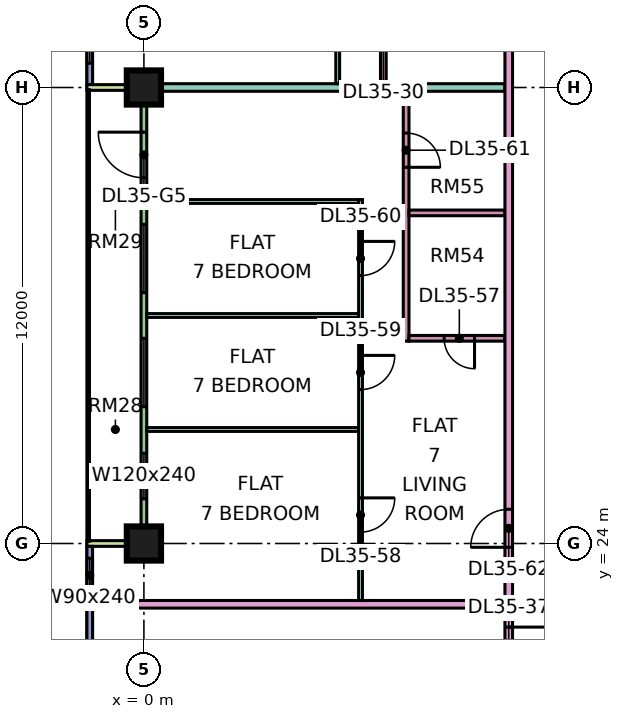
"""IFC4 building model, lengths in metres.
Left out: names, types, materials, properties, quantities, classifications, styles, units other than length and angle.
Written with IfcOpenShell. Run it as: python <this file> out.ifc"""

import sys

from ifc_helpers import new_model, si_unit, direction, frame, frame_2d, origin, origin_2d, place, context, subcontext, project, spatial, rectangle, extrude, element, fill, save


model = new_model("IFC4")
c1 = context("Model", 3, precision=1e-05, world=origin(), true_north=direction((0.0, 1.0)))
c2 = subcontext(c1, "Body", "Model", "MODEL_VIEW")
j1 = project(units=[si_unit("LENGTHUNIT", "METRE"), si_unit("PLANEANGLEUNIT", "RADIAN")], contexts=[c1])
p1 = place(None, origin())
s1 = spatial("IfcSite", under=j1, at=p1, CompositionType="ELEMENT")
p2 = place(p1, origin())
s2 = spatial("IfcBuilding", under=s1, at=p2, CompositionType="ELEMENT")
p3 = place(p2, frame((0.0, 0.0, 157.4)))
s3 = spatial("IfcBuildingStorey", under=s2, at=p3, CompositionType="ELEMENT", Elevation=157.4)
p4 = place(p3, frame((0.0, 24.0, 0.0), z_axis=(0.0, 0.0, 1.0), x_axis=(1.0, 0.0, 0.0)))
e1 = element("IfcColumn", 1, at=p4, inside=s3, PredefinedType="COLUMN", context=c2, shape_type="SweptSolid", body=[
    extrude(rectangle(XDim=0.9, YDim=0.9, at=origin_2d()), origin(), (0.0, 0.0, 1.0), 3.75),
])
p5 = place(p3, frame((0.0, 36.0, 0.0), z_axis=(0.0, 0.0, 1.0), x_axis=(1.0, 0.0, 0.0)))
e2 = element("IfcColumn", 2, at=p5, inside=s3, PredefinedType="COLUMN", context=c2, shape_type="SweptSolid", body=[
    extrude(rectangle(XDim=0.9, YDim=0.9, at=origin_2d()), origin(), (0.0, 0.0, 1.0), 3.75),
])
p6 = place(p3, frame((-1.425, 47.925, 0.0), z_axis=(0.0, 0.0, 1.0), x_axis=(0.0, -1.0, 0.0)))
e3 = element("IfcWall", 3, at=p6, inside=s3, PredefinedType="SOLIDWALL", context=c2, shape_type="SweptSolid", body=[
    extrude(rectangle(XDim=11.85, YDim=0.15, at=frame_2d((5.925, 0.0))), origin(), (0.0, 0.0, 1.0), 3.35),
])
p7 = place(p6, frame((0.562, 0.0, 0.45)))
e4 = element("IfcOpeningElement", 4, at=p7, cuts=e3, PredefinedType="OPENING", context=c2, shape_type="SweptSolid", body=[
    extrude(rectangle(XDim=1.8, YDim=2.4, at=frame_2d((0.9, 1.2))), frame((0.0, 0.085, 0.0), z_axis=(0.0, -1.0, 0.0), x_axis=(1.0, 0.0, 0.0)), (0.0, 0.0, 1.0), 0.17),
])
p8 = place(p6, frame((3.525, 0.0, 0.45)))
e5 = element("IfcOpeningElement", 5, at=p8, cuts=e3, PredefinedType="OPENING", context=c2, shape_type="SweptSolid", body=[
    extrude(rectangle(XDim=1.8, YDim=2.4, at=frame_2d((0.9, 1.2))), frame((0.0, 0.085, 0.0), z_axis=(0.0, -1.0, 0.0), x_axis=(1.0, 0.0, 0.0)), (0.0, 0.0, 1.0), 0.17),
])
p9 = place(p6, frame((6.525, 0.0, 0.45)))
e6 = element("IfcOpeningElement", 6, at=p9, cuts=e3, PredefinedType="OPENING", context=c2, shape_type="SweptSolid", body=[
    extrude(rectangle(XDim=1.8, YDim=2.4, at=frame_2d((0.9, 1.2))), frame((0.0, 0.085, 0.0), z_axis=(0.0, -1.0, 0.0), x_axis=(1.0, 0.0, 0.0)), (0.0, 0.0, 1.0), 0.17),
])
p10 = place(p6, frame((9.488, 0.0, 0.45)))
e7 = element("IfcOpeningElement", 7, at=p10, cuts=e3, PredefinedType="OPENING", context=c2, shape_type="SweptSolid", body=[
    extrude(rectangle(XDim=1.8, YDim=2.4, at=frame_2d((0.9, 1.2))), frame((0.0, 0.085, 0.0), z_axis=(0.0, -1.0, 0.0), x_axis=(1.0, 0.0, 0.0)), (0.0, 0.0, 1.0), 0.17),
])
p11 = place(p3, frame((0.0, 35.925, 0.0), z_axis=(0.0, 0.0, 1.0), x_axis=(0.0, -1.0, 0.0)))
e8 = element("IfcWall", 8, at=p11, inside=s3, PredefinedType="SOLIDWALL", context=c2, shape_type="SweptSolid", body=[
    extrude(rectangle(XDim=11.85, YDim=0.15, at=frame_2d((5.925, 0.0))), origin(), (0.0, 0.0, 1.0), 3.35),
])
p12 = place(p11, frame((1.1, 0.0, 0.0)))
e9 = element("IfcOpeningElement", 9, at=p12, cuts=e8, PredefinedType="OPENING", context=c2, shape_type="SweptSolid", body=[
    extrude(rectangle(XDim=1.2, YDim=2.4, at=frame_2d((0.6, 1.2))), frame((0.0, 0.085, 0.0), z_axis=(0.0, -1.0, 0.0), x_axis=(1.0, 0.0, 0.0)), (0.0, 0.0, 1.0), 0.17),
])
p13 = place(p11, frame((3.525, 0.0, 0.45)))
e10 = element("IfcOpeningElement", 10, at=p13, cuts=e8, PredefinedType="OPENING", context=c2, shape_type="SweptSolid", body=[
    extrude(rectangle(XDim=1.8, YDim=2.4, at=frame_2d((0.9, 1.2))), frame((0.0, 0.085, 0.0), z_axis=(0.0, -1.0, 0.0), x_axis=(1.0, 0.0, 0.0)), (0.0, 0.0, 1.0), 0.17),
])
p14 = place(p11, frame((6.525, 0.0, 0.45)))
e11 = element("IfcOpeningElement", 11, at=p14, cuts=e8, PredefinedType="OPENING", context=c2, shape_type="SweptSolid", body=[
    extrude(rectangle(XDim=1.8, YDim=2.4, at=frame_2d((0.9, 1.2))), frame((0.0, 0.085, 0.0), z_axis=(0.0, -1.0, 0.0), x_axis=(1.0, 0.0, 0.0)), (0.0, 0.0, 1.0), 0.17),
])
p15 = place(p11, frame((9.55, 0.0, 0.45)))
e12 = element("IfcOpeningElement", 12, at=p15, cuts=e8, PredefinedType="OPENING", context=c2, shape_type="SweptSolid", body=[
    extrude(rectangle(XDim=1.2, YDim=2.4, at=frame_2d((0.6, 1.2))), frame((0.0, 0.085, 0.0), z_axis=(0.0, -1.0, 0.0), x_axis=(1.0, 0.0, 0.0)), (0.0, 0.0, 1.0), 0.17),
])
for number, where, z_axis, x_axis in (
    (13, (-1.5, 36.0, 0.0), (0.0, 0.0, 1.0), (1.0, 0.0, 0.0)),
    (14, (-1.5, 24.0, 0.0), (0.0, 0.0, 1.0), (1.0, 0.0, 0.0)),
):
    element("IfcWall", number, at=place(p3, frame(where, z_axis=z_axis, x_axis=x_axis)), inside=s3, PredefinedType="SOLIDWALL", context=c2, shape_type="SweptSolid", body=[
        extrude(rectangle(XDim=1.5, YDim=0.15, at=frame_2d((0.75, 0.0))), origin(), (0.0, 0.0, 1.0), 3.35),
    ])
p16 = place(p3, frame((-1.425, 23.925, 0.0), z_axis=(0.0, 0.0, 1.0), x_axis=(0.0, -1.0, 0.0)))
e15 = element("IfcWall", 15, at=p16, inside=s3, PredefinedType="SOLIDWALL", context=c2, shape_type="SweptSolid", body=[
    extrude(rectangle(XDim=11.425, YDim=0.15, at=frame_2d((5.712, 0.0))), origin(), (0.0, 0.0, 1.0), 3.35),
])
p17 = place(p16, frame((0.312, 0.0, 0.45)))
e16 = element("IfcOpeningElement", 16, at=p17, cuts=e15, PredefinedType="OPENING", context=c2, shape_type="SweptSolid", body=[
    extrude(rectangle(XDim=0.9, YDim=2.4, at=frame_2d((0.45, 1.2))), frame((0.0, 0.085, 0.0), z_axis=(0.0, -1.0, 0.0), x_axis=(1.0, 0.0, 0.0)), (0.0, 0.0, 1.0), 0.17),
])
p18 = place(p16, frame((6.175, 0.0, 0.45)))
e17 = element("IfcOpeningElement", 17, at=p18, cuts=e15, PredefinedType="OPENING", context=c2, shape_type="SweptSolid", body=[
    extrude(rectangle(XDim=3.0, YDim=2.4, at=frame_2d((1.5, 1.2))), frame((0.0, 0.085, 0.0), z_axis=(0.0, -1.0, 0.0), x_axis=(1.0, 0.0, 0.0)), (0.0, 0.0, 1.0), 0.17),
])
p19 = place(p3, frame((-1.35, 22.4, 0.0), z_axis=(0.0, 0.0, 1.0), x_axis=(1.0, 0.0, 0.0)))
e18 = element("IfcWall", 18, at=p19, inside=s3, PredefinedType="PARTITIONING", context=c2, shape_type="SweptSolid", body=[
    extrude(rectangle(XDim=10.85, YDim=0.2, at=frame_2d((5.425, 0.0))), origin(), (0.0, 0.0, 1.0), 3.35),
])
e19 = element("IfcWall", 19, at=p5, inside=s3, PredefinedType="PARTITIONING", context=c2, shape_type="SweptSolid", body=[
    extrude(rectangle(XDim=9.5, YDim=0.2, at=frame_2d((4.75, 0.0))), origin(), (0.0, 0.0, 1.0), 3.35),
])
for number, where, z_axis, x_axis in (
    (20, (0.074, 27.0, 0.0), (0.0, 0.0, 1.0), (1.0, 0.0, 0.0)),
    (21, (0.074, 30.0, 0.0), (0.0, 0.0, 1.0), (1.0, 0.0, 0.0)),
    (22, (0.074, 33.0, 0.0), (0.0, 0.0, 1.0), (1.0, 0.0, 0.0)),
):
    element("IfcWall", number, at=place(p3, frame(where, z_axis=z_axis, x_axis=x_axis)), inside=s3, PredefinedType="PARTITIONING", context=c2, shape_type="SweptSolid", body=[
        extrude(rectangle(XDim=5.576, YDim=0.1, at=frame_2d((2.788, 0.0))), origin(), (0.0, 0.0, 1.0), 3.35),
    ])
p20 = place(p3, frame((5.1, 36.1, 0.0), z_axis=(0.0, 0.0, 1.0), x_axis=(0.0, 1.0, 0.0)))
e23 = element("IfcWall", 23, at=p20, inside=s3, PredefinedType="PARTITIONING", context=c2, shape_type="SweptSolid", body=[
    extrude(rectangle(XDim=26.826, YDim=0.1, at=frame_2d((13.413, 0.0))), origin(), (0.0, 0.0, 1.0), 3.35),
])
p21 = place(p20, frame((0.95, 0.0, 0.0)))
e24 = element("IfcOpeningElement", 24, at=p21, cuts=e23, PredefinedType="OPENING", context=c2, shape_type="SweptSolid", body=[
    extrude(rectangle(XDim=0.9, YDim=2.1, at=frame_2d((0.45, 1.05))), frame((0.0, 0.06, 0.0), z_axis=(0.0, -1.0, 0.0), x_axis=(1.0, 0.0, 0.0)), (0.0, 0.0, 1.0), 0.12),
])
p22 = place(p20, frame((3.95, 0.0, 0.0)))
e25 = element("IfcOpeningElement", 25, at=p22, cuts=e23, PredefinedType="OPENING", context=c2, shape_type="SweptSolid", body=[
    extrude(rectangle(XDim=0.9, YDim=2.1, at=frame_2d((0.45, 1.05))), frame((0.0, 0.06, 0.0), z_axis=(0.0, -1.0, 0.0), x_axis=(1.0, 0.0, 0.0)), (0.0, 0.0, 1.0), 0.12),
])
p23 = place(p20, frame((6.95, 0.0, 0.0)))
e26 = element("IfcOpeningElement", 26, at=p23, cuts=e23, PredefinedType="OPENING", context=c2, shape_type="SweptSolid", body=[
    extrude(rectangle(XDim=0.9, YDim=2.1, at=frame_2d((0.45, 1.05))), frame((0.0, 0.06, 0.0), z_axis=(0.0, -1.0, 0.0), x_axis=(1.0, 0.0, 0.0)), (0.0, 0.0, 1.0), 0.12),
])
p24 = place(p20, frame((9.95, 0.0, 0.0)))
e27 = element("IfcOpeningElement", 27, at=p24, cuts=e23, PredefinedType="OPENING", context=c2, shape_type="SweptSolid", body=[
    extrude(rectangle(XDim=0.9, YDim=2.1, at=frame_2d((0.45, 1.05))), frame((0.0, 0.06, 0.0), z_axis=(0.0, -1.0, 0.0), x_axis=(1.0, 0.0, 0.0)), (0.0, 0.0, 1.0), 0.12),
])
p25 = place(p20, frame((21.95, 0.0, 0.0)))
e28 = element("IfcOpeningElement", 28, at=p25, cuts=e23, PredefinedType="OPENING", context=c2, shape_type="SweptSolid", body=[
    extrude(rectangle(XDim=0.9, YDim=2.1, at=frame_2d((0.45, 1.05))), frame((0.0, 0.06, 0.0), z_axis=(0.0, -1.0, 0.0), x_axis=(1.0, 0.0, 0.0)), (0.0, 0.0, 1.0), 0.12),
])
p26 = place(p20, frame((15.95, 0.0, 0.0)))
e29 = element("IfcOpeningElement", 29, at=p26, cuts=e23, PredefinedType="OPENING", context=c2, shape_type="SweptSolid", body=[
    extrude(rectangle(XDim=0.9, YDim=2.1, at=frame_2d((0.45, 1.05))), frame((0.0, 0.06, 0.0), z_axis=(0.0, -1.0, 0.0), x_axis=(1.0, 0.0, 0.0)), (0.0, 0.0, 1.0), 0.12),
])
p27 = place(p20, frame((24.95, 0.0, 0.0)))
e30 = element("IfcOpeningElement", 30, at=p27, cuts=e23, PredefinedType="OPENING", context=c2, shape_type="SweptSolid", body=[
    extrude(rectangle(XDim=0.9, YDim=2.1, at=frame_2d((0.45, 1.05))), frame((0.0, 0.06, 0.0), z_axis=(0.0, -1.0, 0.0), x_axis=(1.0, 0.0, 0.0)), (0.0, 0.0, 1.0), 0.12),
])
p28 = place(p3, frame((5.7, 22.5, 0.0), z_axis=(0.0, 0.0, 1.0), x_axis=(0.0, 1.0, 0.0)))
e31 = element("IfcWall", 31, at=p28, inside=s3, PredefinedType="PARTITIONING", context=c2, shape_type="SweptSolid", body=[
    extrude(rectangle(XDim=10.55, YDim=0.1, at=frame_2d((5.275, 0.0))), origin(), (0.0, 0.0, 1.0), 3.35),
])
p29 = place(p28, frame((1.8, 0.0, 0.0)))
e32 = element("IfcOpeningElement", 32, at=p29, cuts=e31, PredefinedType="OPENING", context=c2, shape_type="SweptSolid", body=[
    extrude(rectangle(XDim=0.9, YDim=2.1, at=frame_2d((0.45, 1.05))), frame((0.0, 0.06, 0.0), z_axis=(0.0, -1.0, 0.0), x_axis=(1.0, 0.0, 0.0)), (0.0, 0.0, 1.0), 0.12),
])
p30 = place(p28, frame((5.55, 0.0, 0.0)))
e33 = element("IfcOpeningElement", 33, at=p30, cuts=e31, PredefinedType="OPENING", context=c2, shape_type="SweptSolid", body=[
    extrude(rectangle(XDim=0.9, YDim=2.1, at=frame_2d((0.45, 1.05))), frame((0.0, 0.06, 0.0), z_axis=(0.0, -1.0, 0.0), x_axis=(1.0, 0.0, 0.0)), (0.0, 0.0, 1.0), 0.12),
])
p31 = place(p28, frame((8.55, 0.0, 0.0)))
e34 = element("IfcOpeningElement", 34, at=p31, cuts=e31, PredefinedType="OPENING", context=c2, shape_type="SweptSolid", body=[
    extrude(rectangle(XDim=0.9, YDim=2.1, at=frame_2d((0.45, 1.05))), frame((0.0, 0.06, 0.0), z_axis=(0.0, -1.0, 0.0), x_axis=(1.0, 0.0, 0.0)), (0.0, 0.0, 1.0), 0.12),
])
p32 = place(p3, frame((6.3, 36.1, 0.0), z_axis=(0.0, 0.0, 1.0), x_axis=(0.0, 1.0, 0.0)))
e35 = element("IfcWall", 35, at=p32, inside=s3, PredefinedType="PARTITIONING", context=c2, shape_type="SweptSolid", body=[
    extrude(rectangle(XDim=23.65, YDim=0.15, at=frame_2d((11.825, 0.0))), origin(), (0.0, 0.0, 1.0), 3.35),
])
p33 = place(p32, frame((15.95, 0.0, 0.0)))
e36 = element("IfcOpeningElement", 36, at=p33, cuts=e35, PredefinedType="OPENING", context=c2, shape_type="SweptSolid", body=[
    extrude(rectangle(XDim=0.8, YDim=2.1, at=frame_2d((0.4, 1.05))), frame((0.0, 0.085, 0.0), z_axis=(0.0, -1.0, 0.0), x_axis=(1.0, 0.0, 0.0)), (0.0, 0.0, 1.0), 0.17),
])
p34 = place(p32, frame((5.75, 0.0, 0.0)))
e37 = element("IfcOpeningElement", 37, at=p34, cuts=e35, PredefinedType="OPENING", context=c2, shape_type="SweptSolid", body=[
    extrude(rectangle(XDim=0.9, YDim=2.1, at=frame_2d((0.45, 1.05))), frame((0.0, 0.085, 0.0), z_axis=(0.0, -1.0, 0.0), x_axis=(1.0, 0.0, 0.0)), (0.0, 0.0, 1.0), 0.17),
])
p35 = place(p32, frame((0.95, 0.0, 0.0)))
e38 = element("IfcOpeningElement", 38, at=p35, cuts=e35, PredefinedType="OPENING", context=c2, shape_type="SweptSolid", body=[
    extrude(rectangle(XDim=0.8, YDim=2.1, at=frame_2d((0.4, 1.05))), frame((0.0, 0.085, 0.0), z_axis=(0.0, -1.0, 0.0), x_axis=(1.0, 0.0, 0.0)), (0.0, 0.0, 1.0), 0.17),
])
p36 = place(p32, frame((10.55, 0.0, 0.0)))
e39 = element("IfcOpeningElement", 39, at=p36, cuts=e35, PredefinedType="OPENING", context=c2, shape_type="SweptSolid", body=[
    extrude(rectangle(XDim=0.8, YDim=2.1, at=frame_2d((0.4, 1.05))), frame((0.0, 0.085, 0.0), z_axis=(0.0, -1.0, 0.0), x_axis=(1.0, 0.0, 0.0)), (0.0, 0.0, 1.0), 0.17),
])
p37 = place(p32, frame((13.4, 0.0, 0.0)))
e40 = element("IfcOpeningElement", 40, at=p37, cuts=e35, PredefinedType="OPENING", context=c2, shape_type="SweptSolid", body=[
    extrude(rectangle(XDim=0.8, YDim=2.1, at=frame_2d((0.4, 1.05))), frame((0.0, 0.085, 0.0), z_axis=(0.0, -1.0, 0.0), x_axis=(1.0, 0.0, 0.0)), (0.0, 0.0, 1.0), 0.17),
])
p38 = place(p3, frame((6.9, 29.325, 0.0), z_axis=(0.0, 0.0, 1.0), x_axis=(0.0, 1.0, 0.0)))
e41 = element("IfcWall", 41, at=p38, inside=s3, PredefinedType="PARTITIONING", context=c2, shape_type="SweptSolid", body=[
    extrude(rectangle(XDim=6.575, YDim=0.15, at=frame_2d((3.288, 0.0))), origin(), (0.0, 0.0, 1.0), 3.35),
])
p39 = place(p38, frame((4.575, 0.0, 0.0)))
e42 = element("IfcOpeningElement", 42, at=p39, cuts=e41, PredefinedType="OPENING", context=c2, shape_type="SweptSolid", body=[
    extrude(rectangle(XDim=0.9, YDim=2.1, at=frame_2d((0.45, 1.05))), frame((0.0, 0.085, 0.0), z_axis=(0.0, -1.0, 0.0), x_axis=(1.0, 0.0, 0.0)), (0.0, 0.0, 1.0), 0.17),
])
p40 = place(p3, frame((6.975, 29.4, 0.0), z_axis=(0.0, 0.0, 1.0), x_axis=(1.0, 0.0, 0.0)))
e43 = element("IfcWall", 43, at=p40, inside=s3, PredefinedType="PARTITIONING", context=c2, shape_type="SweptSolid", body=[
    extrude(rectangle(XDim=2.525, YDim=0.15, at=frame_2d((1.262, 0.0))), origin(), (0.0, 0.0, 1.0), 3.35),
])
p41 = place(p40, frame((0.925, 0.0, 0.0)))
e44 = element("IfcOpeningElement", 44, at=p41, cuts=e43, PredefinedType="OPENING", context=c2, shape_type="SweptSolid", body=[
    extrude(rectangle(XDim=0.8, YDim=2.1, at=frame_2d((0.4, 1.05))), frame((0.0, 0.085, 0.0), z_axis=(0.0, -1.0, 0.0), x_axis=(1.0, 0.0, 0.0)), (0.0, 0.0, 1.0), 0.17),
])
p42 = place(p3, frame((6.975, 32.7, 0.0), z_axis=(0.0, 0.0, 1.0), x_axis=(1.0, 0.0, 0.0)))
e45 = element("IfcWall", 45, at=p42, inside=s3, PredefinedType="PARTITIONING", context=c2, shape_type="SweptSolid", body=[
    extrude(rectangle(XDim=2.525, YDim=0.15, at=frame_2d((1.262, 0.0))), origin(), (0.0, 0.0, 1.0), 3.35),
])
p43 = place(p3, frame((9.6, 20.0, 0.0), z_axis=(0.0, 0.0, 1.0), x_axis=(0.0, 1.0, 0.0)))
e46 = element("IfcWall", 46, at=p43, inside=s3, PredefinedType="PARTITIONING", context=c2, shape_type="SweptSolid", body=[
    extrude(rectangle(XDim=42.926, YDim=0.2, at=frame_2d((21.463, 0.0))), origin(), (0.0, 0.0, 1.0), 3.35),
])
p44 = place(p43, frame((40.8, 0.0, 0.0)))
e47 = element("IfcOpeningElement", 47, at=p44, cuts=e46, PredefinedType="OPENING", context=c2, shape_type="SweptSolid", body=[
    extrude(rectangle(XDim=1.0, YDim=2.1, at=frame_2d((0.5, 1.05))), frame((0.0, 0.11, 0.0), z_axis=(0.0, -1.0, 0.0), x_axis=(1.0, 0.0, 0.0)), (0.0, 0.0, 1.0), 0.22),
])
p45 = place(p43, frame((0.6, 0.0, 0.0)))
e48 = element("IfcOpeningElement", 48, at=p45, cuts=e46, PredefinedType="OPENING", context=c2, shape_type="SweptSolid", body=[
    extrude(rectangle(XDim=1.2, YDim=2.1, at=frame_2d((0.6, 1.05))), frame((0.0, 0.11, 0.0), z_axis=(0.0, -1.0, 0.0), x_axis=(1.0, 0.0, 0.0)), (0.0, 0.0, 1.0), 0.22),
])
p46 = place(p43, frame((3.9, 0.0, 0.0)))
e49 = element("IfcOpeningElement", 49, at=p46, cuts=e46, PredefinedType="OPENING", context=c2, shape_type="SweptSolid", body=[
    extrude(rectangle(XDim=1.0, YDim=2.1, at=frame_2d((0.5, 1.05))), frame((0.0, 0.11, 0.0), z_axis=(0.0, -1.0, 0.0), x_axis=(1.0, 0.0, 0.0)), (0.0, 0.0, 1.0), 0.22),
])
p47 = place(p10, origin())
e50 = element("IfcWindow", 50, at=p47, inside=s3, PartitioningType="SINGLE_PANEL", PredefinedType="WINDOW", context=c2, shape_type="SweptSolid", body=[
    extrude(rectangle(XDim=1.8, YDim=2.4, at=frame_2d((0.9, 1.2))), frame((0.0, 0.03, 0.0), z_axis=(0.0, -1.0, 0.0), x_axis=(1.0, 0.0, 0.0)), (0.0, 0.0, 1.0), 0.06),
])
fill(e7, e50)
p48 = place(p12, frame((1.2, 0.0, 0.0), z_axis=(0.0, 0.0, 1.0), x_axis=(-1.0, 0.0, 0.0)))
e51 = element("IfcDoor", 51, at=p48, inside=s3, OperationType="DOUBLE_DOOR_SINGLE_SWING", PredefinedType="DOOR", context=c2, shape_type="SweptSolid", body=[
    extrude(rectangle(XDim=1.2, YDim=2.4, at=frame_2d((0.6, 1.2))), frame((0.0, 0.025, 0.0), z_axis=(0.0, -1.0, 0.0), x_axis=(1.0, 0.0, 0.0)), (0.0, 0.0, 1.0), 0.05),
])
fill(e9, e51)
p49 = place(p13, origin())
e52 = element("IfcWindow", 52, at=p49, inside=s3, PartitioningType="SINGLE_PANEL", PredefinedType="WINDOW", context=c2, shape_type="SweptSolid", body=[
    extrude(rectangle(XDim=1.8, YDim=2.4, at=frame_2d((0.9, 1.2))), frame((0.0, 0.03, 0.0), z_axis=(0.0, -1.0, 0.0), x_axis=(1.0, 0.0, 0.0)), (0.0, 0.0, 1.0), 0.06),
])
fill(e10, e52)
p50 = place(p14, origin())
e53 = element("IfcWindow", 53, at=p50, inside=s3, PartitioningType="SINGLE_PANEL", PredefinedType="WINDOW", context=c2, shape_type="SweptSolid", body=[
    extrude(rectangle(XDim=1.8, YDim=2.4, at=frame_2d((0.9, 1.2))), frame((0.0, 0.03, 0.0), z_axis=(0.0, -1.0, 0.0), x_axis=(1.0, 0.0, 0.0)), (0.0, 0.0, 1.0), 0.06),
])
fill(e11, e53)
p51 = place(p15, origin())
e54 = element("IfcWindow", 54, at=p51, inside=s3, PartitioningType="SINGLE_PANEL", PredefinedType="WINDOW", context=c2, shape_type="SweptSolid", body=[
    extrude(rectangle(XDim=1.2, YDim=2.4, at=frame_2d((0.6, 1.2))), frame((0.0, 0.03, 0.0), z_axis=(0.0, -1.0, 0.0), x_axis=(1.0, 0.0, 0.0)), (0.0, 0.0, 1.0), 0.06),
])
fill(e12, e54)
p52 = place(p17, origin())
e55 = element("IfcWindow", 55, at=p52, inside=s3, PartitioningType="SINGLE_PANEL", PredefinedType="WINDOW", context=c2, shape_type="SweptSolid", body=[
    extrude(rectangle(XDim=0.9, YDim=2.4, at=frame_2d((0.45, 1.2))), frame((0.0, 0.03, 0.0), z_axis=(0.0, -1.0, 0.0), x_axis=(1.0, 0.0, 0.0)), (0.0, 0.0, 1.0), 0.06),
])
fill(e16, e55)
p53 = place(p45, origin())
e56 = element("IfcDoor", 56, at=p53, inside=s3, OperationType="SINGLE_SWING_RIGHT", PredefinedType="DOOR", context=c2, shape_type="SweptSolid", body=[
    extrude(rectangle(XDim=1.2, YDim=2.1, at=frame_2d((0.6, 1.05))), frame((0.0, 0.025, 0.0), z_axis=(0.0, -1.0, 0.0), x_axis=(1.0, 0.0, 0.0)), (0.0, 0.0, 1.0), 0.05),
])
fill(e48, e56)
p54 = place(p41, origin())
e57 = element("IfcDoor", 57, at=p54, inside=s3, OperationType="SINGLE_SWING_RIGHT", PredefinedType="DOOR", context=c2, shape_type="SweptSolid", body=[
    extrude(rectangle(XDim=0.8, YDim=2.1, at=frame_2d((0.4, 1.05))), frame((0.0, 0.025, 0.0), z_axis=(0.0, -1.0, 0.0), x_axis=(1.0, 0.0, 0.0)), (0.0, 0.0, 1.0), 0.05),
])
fill(e44, e57)
p55 = place(p29, origin())
e58 = element("IfcDoor", 58, at=p55, inside=s3, OperationType="SINGLE_SWING_RIGHT", PredefinedType="DOOR", context=c2, shape_type="SweptSolid", body=[
    extrude(rectangle(XDim=0.9, YDim=2.1, at=frame_2d((0.45, 1.05))), frame((0.0, 0.025, 0.0), z_axis=(0.0, -1.0, 0.0), x_axis=(1.0, 0.0, 0.0)), (0.0, 0.0, 1.0), 0.05),
])
fill(e32, e58)
p56 = place(p30, origin())
e59 = element("IfcDoor", 59, at=p56, inside=s3, OperationType="SINGLE_SWING_RIGHT", PredefinedType="DOOR", context=c2, shape_type="SweptSolid", body=[
    extrude(rectangle(XDim=0.9, YDim=2.1, at=frame_2d((0.45, 1.05))), frame((0.0, 0.025, 0.0), z_axis=(0.0, -1.0, 0.0), x_axis=(1.0, 0.0, 0.0)), (0.0, 0.0, 1.0), 0.05),
])
fill(e33, e59)
p57 = place(p31, origin())
e60 = element("IfcDoor", 60, at=p57, inside=s3, OperationType="SINGLE_SWING_RIGHT", PredefinedType="DOOR", context=c2, shape_type="SweptSolid", body=[
    extrude(rectangle(XDim=0.9, YDim=2.1, at=frame_2d((0.45, 1.05))), frame((0.0, 0.025, 0.0), z_axis=(0.0, -1.0, 0.0), x_axis=(1.0, 0.0, 0.0)), (0.0, 0.0, 1.0), 0.05),
])
fill(e34, e60)
p58 = place(p39, frame((0.9, 0.0, 0.0), z_axis=(0.0, 0.0, 1.0), x_axis=(-1.0, 0.0, 0.0)))
e61 = element("IfcDoor", 61, at=p58, inside=s3, OperationType="SINGLE_SWING_LEFT", PredefinedType="DOOR", context=c2, shape_type="SweptSolid", body=[
    extrude(rectangle(XDim=0.9, YDim=2.1, at=frame_2d((0.45, 1.05))), frame((0.0, 0.025, 0.0), z_axis=(0.0, -1.0, 0.0), x_axis=(1.0, 0.0, 0.0)), (0.0, 0.0, 1.0), 0.05),
])
fill(e42, e61)
p59 = place(p46, origin())
e62 = element("IfcDoor", 62, at=p59, inside=s3, OperationType="SINGLE_SWING_LEFT", PredefinedType="DOOR", context=c2, shape_type="SweptSolid", body=[
    extrude(rectangle(XDim=1.0, YDim=2.1, at=frame_2d((0.5, 1.05))), frame((0.0, 0.025, 0.0), z_axis=(0.0, -1.0, 0.0), x_axis=(1.0, 0.0, 0.0)), (0.0, 0.0, 1.0), 0.05),
])
fill(e49, e62)
save(model, sys.argv[1])
